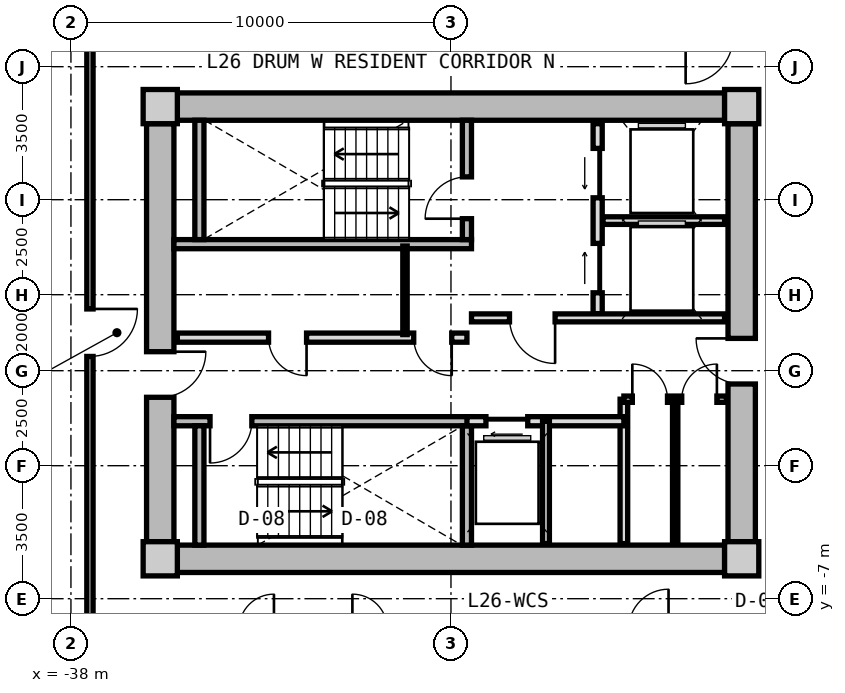
"""IFC4 building model, lengths in metres.
Left out: names, types, materials, properties, quantities, classifications, styles, units other than length and angle.
Written with IfcOpenShell. Run it as: python <this file> out.ifc"""

import sys

from ifc_helpers import new_model, si_unit, direction, frame, frame_2d, origin, origin_2d, place, context, subcontext, project, spatial, rectangle, extrude, source, transform, mapped, element, fill, save


model = new_model("IFC4")
c1 = context("Model", 3, precision=1e-05, world=origin(), true_north=direction((0.0, 1.0)))
c2 = subcontext(c1, "Body", "Model", "MODEL_VIEW")
j1 = project(units=[si_unit("LENGTHUNIT", "METRE"), si_unit("PLANEANGLEUNIT", "RADIAN")], contexts=[c1])
p1 = place(None, origin())
s1 = spatial("IfcSite", under=j1, at=p1, CompositionType="ELEMENT")
p2 = place(p1, origin())
s2 = spatial("IfcBuilding", under=s1, at=p2, CompositionType="ELEMENT")
p3 = place(p2, frame((0.0, 0.0, 87.1)))
s3 = spatial("IfcBuildingStorey", under=s2, at=p3, CompositionType="ELEMENT", Elevation=87.1)
m1 = source(origin(), c2, "Body", "SweptSolid", [
    extrude(rectangle(XDim=0.9, YDim=0.9, at=origin_2d()), origin(), (0.0, 0.0, 1.0), 3.05),
])
for number, where, z_axis, x_axis in (
    (1, (-35.65, -5.95, 0.0), (0.0, 0.0, 1.0), (1.0, 0.0, 0.0)),
    (2, (-20.35, -5.95, 0.0), (0.0, 0.0, 1.0), (1.0, 0.0, 0.0)),
    (3, (-20.35, 5.95, 0.0), (0.0, 0.0, 1.0), (1.0, 0.0, 0.0)),
    (4, (-35.65, 5.95, 0.0), (0.0, 0.0, 1.0), (1.0, 0.0, 0.0)),
):
    element("IfcColumn", number, at=place(p3, frame(where, z_axis=z_axis, x_axis=x_axis)), inside=s3, PredefinedType="COLUMN", context=c2, shape_type="MappedRepresentation", body=[
        mapped(m1, transform((0.0, 0.0, 0.0), x_axis=(1.0, 0.0, 0.0), y_axis=(0.0, 1.0, 0.0), z_axis=(0.0, 0.0, 1.0), scale=1.0)),
    ])
m2 = source(origin(), c2, "Body", "SweptSolid", [
    extrude(rectangle(XDim=14.4, YDim=0.72, at=frame_2d((7.2, 0.0))), origin(), (0.0, 0.0, 1.0), 2.79),
])
for number, where, z_axis, x_axis in (
    (5, (-35.2, 5.95, 0.0), (0.0, 0.0, 1.0), (1.0, 0.0, 0.0)),
    (6, (-20.8, -5.95, 0.0), (0.0, 0.0, 1.0), (-1.0, 0.0, 0.0)),
):
    element("IfcWall", number, at=place(p3, frame(where, z_axis=z_axis, x_axis=x_axis)), inside=s3, PredefinedType="SHEAR", context=c2, shape_type="MappedRepresentation", body=[
        mapped(m2, transform((0.0, 0.0, 0.0), x_axis=(1.0, 0.0, 0.0), y_axis=(0.0, 1.0, 0.0), z_axis=(0.0, 0.0, 1.0), scale=1.0)),
    ])
m3 = source(origin(), c2, "Body", "SweptSolid", [
    extrude(rectangle(XDim=11.0, YDim=0.72, at=frame_2d((5.5, 0.0))), origin(), (0.0, 0.0, 1.0), 2.79),
])
p4 = place(p3, frame((-35.65, -5.5, 0.0), z_axis=(0.0, 0.0, 1.0), x_axis=(0.0, 1.0, 0.0)))
e7 = element("IfcWall", 7, at=p4, inside=s3, PredefinedType="SHEAR", context=c2, shape_type="MappedRepresentation", body=[
    mapped(m3, transform((0.0, 0.0, 0.0), x_axis=(1.0, 0.0, 0.0), y_axis=(0.0, 1.0, 0.0), z_axis=(0.0, 0.0, 1.0), scale=1.0)),
])
p5 = place(p4, frame((3.8, 0.0, 0.0)))
e8 = element("IfcOpeningElement", 8, at=p5, cuts=e7, PredefinedType="OPENING", context=c2, shape_type="SweptSolid", body=[
    extrude(rectangle(XDim=1.2, YDim=2.15, at=frame_2d((0.6, 1.075))), frame((0.0, 0.37, 0.0), z_axis=(0.0, -1.0, 0.0), x_axis=(1.0, 0.0, 0.0)), (0.0, 0.0, 1.0), 0.74),
])
p6 = place(p3, frame((-20.35, 5.5, 0.0), z_axis=(0.0, 0.0, 1.0), x_axis=(0.0, -1.0, 0.0)))
e9 = element("IfcWall", 9, at=p6, inside=s3, PredefinedType="SHEAR", context=c2, shape_type="MappedRepresentation", body=[
    mapped(m3, transform((0.0, 0.0, 0.0), x_axis=(1.0, 0.0, 0.0), y_axis=(0.0, 1.0, 0.0), z_axis=(0.0, 0.0, 1.0), scale=1.0)),
])
p7 = place(p6, frame((5.65, 0.0, 0.0)))
e10 = element("IfcOpeningElement", 10, at=p7, cuts=e9, PredefinedType="OPENING", context=c2, shape_type="SweptSolid", body=[
    extrude(rectangle(XDim=1.2, YDim=2.15, at=frame_2d((0.6, 1.075))), frame((0.0, 0.37, 0.0), z_axis=(0.0, -1.0, 0.0), x_axis=(1.0, 0.0, 0.0)), (0.0, 0.0, 1.0), 0.74),
])
m4 = source(origin(), c2, "Body", "SweptSolid", [
    extrude(rectangle(XDim=7.83, YDim=0.24, at=frame_2d((3.915, 0.0))), origin(), (0.0, 0.0, 1.0), 2.79),
])
p8 = place(p3, frame((-35.29, 2.33, 0.0), z_axis=(0.0, 0.0, 1.0), x_axis=(1.0, 0.0, 0.0)))
e11 = element("IfcWall", 11, at=p8, inside=s3, PredefinedType="PARTITIONING", context=c2, shape_type="MappedRepresentation", body=[
    mapped(m4, transform((0.0, 0.0, 0.0), x_axis=(1.0, 0.0, 0.0), y_axis=(0.0, 1.0, 0.0), z_axis=(0.0, 0.0, 1.0), scale=1.0)),
])
m5 = source(origin(), c2, "Body", "SweptSolid", [
    extrude(rectangle(XDim=3.14, YDim=0.24, at=frame_2d((1.57, 0.0))), origin(), (0.0, 0.0, 1.0), 2.79),
])
p9 = place(p3, frame((-34.62, 2.45, 0.0), z_axis=(0.0, 0.0, 1.0), x_axis=(0.0, 1.0, 0.0)))
e12 = element("IfcWall", 12, at=p9, inside=s3, PredefinedType="PARTITIONING", context=c2, shape_type="MappedRepresentation", body=[
    mapped(m5, transform((0.0, 0.0, 0.0), x_axis=(1.0, 0.0, 0.0), y_axis=(0.0, 1.0, 0.0), z_axis=(0.0, 0.0, 1.0), scale=1.0)),
])
p10 = place(p3, frame((-27.58, 2.45, 0.0), z_axis=(0.0, 0.0, 1.0), x_axis=(0.0, 1.0, 0.0)))
e13 = element("IfcWall", 13, at=p10, inside=s3, PredefinedType="PARTITIONING", context=c2, shape_type="MappedRepresentation", body=[
    mapped(m5, transform((0.0, 0.0, 0.0), x_axis=(1.0, 0.0, 0.0), y_axis=(0.0, 1.0, 0.0), z_axis=(0.0, 0.0, 1.0), scale=1.0)),
])
p11 = place(p10, frame((0.55, 0.0, 0.0)))
e14 = element("IfcOpeningElement", 14, at=p11, cuts=e13, PredefinedType="OPENING", context=c2, shape_type="SweptSolid", body=[
    extrude(rectangle(XDim=1.1, YDim=2.15, at=frame_2d((0.55, 1.075))), frame((0.0, 0.13, 0.0), z_axis=(0.0, -1.0, 0.0), x_axis=(1.0, 0.0, 0.0)), (0.0, 0.0, 1.0), 0.26),
])
p12 = place(p3, frame((-35.29, -2.33, 0.0), z_axis=(0.0, 0.0, 1.0), x_axis=(1.0, 0.0, 0.0)))
e15 = element("IfcWall", 15, at=p12, inside=s3, PredefinedType="PARTITIONING", context=c2, shape_type="MappedRepresentation", body=[
    mapped(m4, transform((0.0, 0.0, 0.0), x_axis=(1.0, 0.0, 0.0), y_axis=(0.0, 1.0, 0.0), z_axis=(0.0, 0.0, 1.0), scale=1.0)),
])
p13 = place(p12, frame((0.95, 0.0, 0.0)))
e16 = element("IfcOpeningElement", 16, at=p13, cuts=e15, PredefinedType="OPENING", context=c2, shape_type="SweptSolid", body=[
    extrude(rectangle(XDim=1.1, YDim=2.15, at=frame_2d((0.55, 1.075))), frame((0.0, 0.13, 0.0), z_axis=(0.0, -1.0, 0.0), x_axis=(1.0, 0.0, 0.0)), (0.0, 0.0, 1.0), 0.26),
])
for number, where, z_axis, x_axis in (
    (17, (-34.62, -5.59, 0.0), (0.0, 0.0, 1.0), (0.0, 1.0, 0.0)),
    (18, (-27.58, -5.59, 0.0), (0.0, 0.0, 1.0), (0.0, 1.0, 0.0)),
):
    element("IfcWall", number, at=place(p3, frame(where, z_axis=z_axis, x_axis=x_axis)), inside=s3, PredefinedType="PARTITIONING", context=c2, shape_type="MappedRepresentation", body=[
        mapped(m5, transform((0.0, 0.0, 0.0), x_axis=(1.0, 0.0, 0.0), y_axis=(0.0, 1.0, 0.0), z_axis=(0.0, 0.0, 1.0), scale=1.0)),
    ])
m6 = source(origin(), c2, "Body", "SweptSolid", [
    extrude(rectangle(XDim=5.0, YDim=0.24, at=frame_2d((2.5, 0.0))), origin(), (0.0, 0.0, 1.0), 2.775),
])
p14 = place(p3, frame((-24.14, 0.5, 0.0), z_axis=(0.0, 0.0, 1.0), x_axis=(0.0, 1.0, 0.0)))
e19 = element("IfcWall", 19, at=p14, inside=s3, PredefinedType="PARTITIONING", context=c2, shape_type="MappedRepresentation", body=[
    mapped(m6, transform((0.0, 0.0, 0.0), x_axis=(1.0, 0.0, 0.0), y_axis=(0.0, 1.0, 0.0), z_axis=(0.0, 0.0, 1.0), scale=1.0)),
])
p15 = place(p14, frame((3.05, 0.0, 0.0)))
e20 = element("IfcOpeningElement", 20, at=p15, cuts=e19, PredefinedType="OPENING", context=c2, shape_type="SweptSolid", body=[
    extrude(rectangle(XDim=1.3, YDim=2.2, at=frame_2d((0.65, 1.1))), frame((0.0, 0.13, 0.0), z_axis=(0.0, -1.0, 0.0), x_axis=(1.0, 0.0, 0.0)), (0.0, 0.0, 1.0), 0.26),
])
p16 = place(p14, frame((0.55, 0.0, 0.0)))
e21 = element("IfcOpeningElement", 21, at=p16, cuts=e19, PredefinedType="OPENING", context=c2, shape_type="SweptSolid", body=[
    extrude(rectangle(XDim=1.3, YDim=2.2, at=frame_2d((0.65, 1.1))), frame((0.0, 0.13, 0.0), z_axis=(0.0, -1.0, 0.0), x_axis=(1.0, 0.0, 0.0)), (0.0, 0.0, 1.0), 0.26),
])
m7 = source(origin(), c2, "Body", "SweptSolid", [
    extrude(rectangle(XDim=3.2, YDim=0.2, at=frame_2d((1.6, 0.0))), origin(), (0.0, 0.0, 1.0), 2.775),
])
p17 = place(p3, frame((-24.0, 2.95, 0.0), z_axis=(0.0, 0.0, 1.0), x_axis=(1.0, 0.0, 0.0)))
e22 = element("IfcWall", 22, at=p17, inside=s3, PredefinedType="PARTITIONING", context=c2, shape_type="MappedRepresentation", body=[
    mapped(m7, transform((0.0, 0.0, 0.0), x_axis=(1.0, 0.0, 0.0), y_axis=(0.0, 1.0, 0.0), z_axis=(0.0, 0.0, 1.0), scale=1.0)),
])
m8 = source(origin(), c2, "Body", "SweptSolid", [
    extrude(rectangle(XDim=6.66, YDim=0.21, at=frame_2d((3.33, 0.0))), origin(), (0.0, 0.0, 1.0), 2.775),
])
p18 = place(p3, frame((-27.46, 0.39, 0.0), z_axis=(0.0, 0.0, 1.0), x_axis=(1.0, 0.0, 0.0)))
e23 = element("IfcWall", 23, at=p18, inside=s3, PredefinedType="PARTITIONING", context=c2, shape_type="MappedRepresentation", body=[
    mapped(m8, transform((0.0, 0.0, 0.0), x_axis=(1.0, 0.0, 0.0), y_axis=(0.0, 1.0, 0.0), z_axis=(0.0, 0.0, 1.0), scale=1.0)),
])
p19 = place(p18, frame((1.0, 0.0, 0.0)))
e24 = element("IfcOpeningElement", 24, at=p19, cuts=e23, PredefinedType="OPENING", context=c2, shape_type="SweptSolid", body=[
    extrude(rectangle(XDim=1.2, YDim=2.15, at=frame_2d((0.6, 1.075))), frame((0.0, 0.115, 0.0), z_axis=(0.0, -1.0, 0.0), x_axis=(1.0, 0.0, 0.0)), (0.0, 0.0, 1.0), 0.23),
])
m9 = source(origin(), c2, "Body", "SweptSolid", [
    extrude(rectangle(XDim=7.62, YDim=0.24, at=frame_2d((3.81, 0.0))), origin(), (0.0, 0.0, 1.0), 2.775),
])
p20 = place(p3, frame((-35.2, -0.13, 0.0), z_axis=(0.0, 0.0, 1.0), x_axis=(1.0, 0.0, 0.0)))
e25 = element("IfcWall", 25, at=p20, inside=s3, PredefinedType="PARTITIONING", context=c2, shape_type="MappedRepresentation", body=[
    mapped(m9, transform((0.0, 0.0, 0.0), x_axis=(1.0, 0.0, 0.0), y_axis=(0.0, 1.0, 0.0), z_axis=(0.0, 0.0, 1.0), scale=1.0)),
])
p21 = place(p20, frame((6.22, 0.0, 0.0)))
e26 = element("IfcOpeningElement", 26, at=p21, cuts=e25, PredefinedType="OPENING", context=c2, shape_type="SweptSolid", body=[
    extrude(rectangle(XDim=1.0, YDim=2.1, at=frame_2d((0.5, 1.05))), frame((0.0, 0.13, 0.0), z_axis=(0.0, -1.0, 0.0), x_axis=(1.0, 0.0, 0.0)), (0.0, 0.0, 1.0), 0.26),
])
p22 = place(p20, frame((2.4, 0.0, 0.0)))
e27 = element("IfcOpeningElement", 27, at=p22, cuts=e25, PredefinedType="OPENING", context=c2, shape_type="SweptSolid", body=[
    extrude(rectangle(XDim=1.0, YDim=2.1, at=frame_2d((0.5, 1.05))), frame((0.0, 0.13, 0.0), z_axis=(0.0, -1.0, 0.0), x_axis=(1.0, 0.0, 0.0)), (0.0, 0.0, 1.0), 0.26),
])
m10 = source(origin(), c2, "Body", "SweptSolid", [
    extrude(rectangle(XDim=2.33, YDim=0.115, at=frame_2d((1.165, 0.0))), origin(), (0.0, 0.0, 1.0), 2.775),
])
p23 = place(p3, frame((-29.21, -0.05, 0.0), z_axis=(0.0, 0.0, 1.0), x_axis=(0.0, 1.0, 0.0)))
e28 = element("IfcWall", 28, at=p23, inside=s3, PredefinedType="PARTITIONING", context=c2, shape_type="MappedRepresentation", body=[
    mapped(m10, transform((0.0, 0.0, 0.0), x_axis=(1.0, 0.0, 0.0), y_axis=(0.0, 1.0, 0.0), z_axis=(0.0, 0.0, 1.0), scale=1.0)),
])
m11 = source(origin(), c2, "Body", "SweptSolid", [
    extrude(rectangle(XDim=3.8, YDim=0.2, at=frame_2d((1.9, 0.0))), origin(), (0.0, 0.0, 1.0), 2.775),
])
p24 = place(p3, frame((-23.45, -5.55, 0.0), z_axis=(0.0, 0.0, 1.0), x_axis=(0.0, 1.0, 0.0)))
e29 = element("IfcWall", 29, at=p24, inside=s3, PredefinedType="PARTITIONING", context=c2, shape_type="MappedRepresentation", body=[
    mapped(m11, transform((0.0, 0.0, 0.0), x_axis=(1.0, 0.0, 0.0), y_axis=(0.0, 1.0, 0.0), z_axis=(0.0, 0.0, 1.0), scale=1.0)),
])
m12 = source(origin(), c2, "Body", "SweptSolid", [
    extrude(rectangle(XDim=4.13, YDim=0.24, at=frame_2d((2.065, 0.0))), origin(), (0.0, 0.0, 1.0), 2.775),
])
p25 = place(p3, frame((-27.58, -2.33, 0.0), z_axis=(0.0, 0.0, 1.0), x_axis=(1.0, 0.0, 0.0)))
e30 = element("IfcWall", 30, at=p25, inside=s3, PredefinedType="PARTITIONING", context=c2, shape_type="MappedRepresentation", body=[
    mapped(m12, transform((0.0, 0.0, 0.0), x_axis=(1.0, 0.0, 0.0), y_axis=(0.0, 1.0, 0.0), z_axis=(0.0, 0.0, 1.0), scale=1.0)),
])
p26 = place(p25, frame((0.5, 0.0, 0.0)))
e31 = element("IfcOpeningElement", 31, at=p26, cuts=e30, PredefinedType="OPENING", context=c2, shape_type="SweptSolid", body=[
    extrude(rectangle(XDim=1.1, YDim=2.2, at=frame_2d((0.55, 1.1))), frame((0.0, 0.13, 0.0), z_axis=(0.0, -1.0, 0.0), x_axis=(1.0, 0.0, 0.0)), (0.0, 0.0, 1.0), 0.26),
])
m13 = source(origin(), c2, "Body", "SweptSolid", [
    extrude(rectangle(XDim=3.22, YDim=0.18, at=frame_2d((1.61, 0.0))), origin(), (0.0, 0.0, 1.0), 2.775),
])
p27 = place(p3, frame((-25.5, -5.55, 0.0), z_axis=(0.0, 0.0, 1.0), x_axis=(0.0, 1.0, 0.0)))
e32 = element("IfcWall", 32, at=p27, inside=s3, PredefinedType="PARTITIONING", context=c2, shape_type="MappedRepresentation", body=[
    mapped(m13, transform((0.0, 0.0, 0.0), x_axis=(1.0, 0.0, 0.0), y_axis=(0.0, 1.0, 0.0), z_axis=(0.0, 0.0, 1.0), scale=1.0)),
])
m14 = source(origin(), c2, "Body", "SweptSolid", [
    extrude(rectangle(XDim=2.7, YDim=0.165, at=frame_2d((1.35, 0.0))), origin(), (0.0, 0.0, 1.0), 2.775),
])
p28 = place(p3, frame((-23.45, -1.75, 0.0), z_axis=(0.0, 0.0, 1.0), x_axis=(1.0, 0.0, 0.0)))
e33 = element("IfcWall", 33, at=p28, inside=s3, PredefinedType="PARTITIONING", context=c2, shape_type="MappedRepresentation", body=[
    mapped(m14, transform((0.0, 0.0, 0.0), x_axis=(1.0, 0.0, 0.0), y_axis=(0.0, 1.0, 0.0), z_axis=(0.0, 0.0, 1.0), scale=1.0)),
])
p29 = place(p28, frame((0.222, 0.0, 0.0)))
e34 = element("IfcOpeningElement", 34, at=p29, cuts=e33, PredefinedType="OPENING", context=c2, shape_type="SweptSolid", body=[
    extrude(rectangle(XDim=0.925, YDim=2.1, at=frame_2d((0.462, 1.05))), frame((0.0, 0.093, 0.0), z_axis=(0.0, -1.0, 0.0), x_axis=(1.0, 0.0, 0.0)), (0.0, 0.0, 1.0), 0.185),
])
p30 = place(p28, frame((1.522, 0.0, 0.0)))
e35 = element("IfcOpeningElement", 35, at=p30, cuts=e33, PredefinedType="OPENING", context=c2, shape_type="SweptSolid", body=[
    extrude(rectangle(XDim=0.925, YDim=2.1, at=frame_2d((0.462, 1.05))), frame((0.0, 0.093, 0.0), z_axis=(0.0, -1.0, 0.0), x_axis=(1.0, 0.0, 0.0)), (0.0, 0.0, 1.0), 0.185),
])
m15 = source(origin(), c2, "Body", "SweptSolid", [
    extrude(rectangle(XDim=3.8, YDim=0.14, at=frame_2d((1.9, 0.0))), origin(), (0.0, 0.0, 1.0), 2.775),
])
p31 = place(p3, frame((-22.1, -5.55, 0.0), z_axis=(0.0, 0.0, 1.0), x_axis=(0.0, 1.0, 0.0)))
e36 = element("IfcWall", 36, at=p31, inside=s3, PredefinedType="PARTITIONING", context=c2, shape_type="MappedRepresentation", body=[
    mapped(m15, transform((0.0, 0.0, 0.0), x_axis=(1.0, 0.0, 0.0), y_axis=(0.0, 1.0, 0.0), z_axis=(0.0, 0.0, 1.0), scale=1.0)),
])
m16 = source(origin(), c2, "Body", "SweptSolid", [
    extrude(rectangle(XDim=15.6, YDim=0.165, at=frame_2d((7.8, 0.0))), origin(), (0.0, 0.0, 1.0), 2.775),
])
p32 = place(p3, frame((-37.5, -7.8, 0.0), z_axis=(0.0, 0.0, 1.0), x_axis=(0.0, 1.0, 0.0)))
e37 = element("IfcWall", 37, at=p32, inside=s3, PredefinedType="PARTITIONING", context=c2, shape_type="MappedRepresentation", body=[
    mapped(m16, transform((0.0, 0.0, 0.0), x_axis=(1.0, 0.0, 0.0), y_axis=(0.0, 1.0, 0.0), z_axis=(0.0, 0.0, 1.0), scale=1.0)),
])
p33 = place(p32, frame((7.175, 0.0, 0.0)))
e38 = element("IfcOpeningElement", 38, at=p33, cuts=e37, PredefinedType="OPENING", context=c2, shape_type="SweptSolid", body=[
    extrude(rectangle(XDim=1.25, YDim=2.2, at=frame_2d((0.625, 1.1))), frame((0.0, 0.093, 0.0), z_axis=(0.0, -1.0, 0.0), x_axis=(1.0, 0.0, 0.0)), (0.0, 0.0, 1.0), 0.185),
])
m17 = source(origin(), c2, "Body", "SweptSolid", [
    extrude(rectangle(XDim=1.1, YDim=2.15, at=frame_2d((0.55, 1.075))), frame((0.0, 0.025, 0.0), z_axis=(0.0, -1.0, 0.0), x_axis=(1.0, 0.0, 0.0)), (0.0, 0.0, 1.0), 0.05),
])
p34 = place(p11, origin())
e39 = element("IfcDoor", 39, at=p34, inside=s3, OperationType="SINGLE_SWING_LEFT", PredefinedType="DOOR", context=c2, shape_type="MappedRepresentation", body=[
    mapped(m17, transform((0.0, 0.0, 0.0), x_axis=(1.0, 0.0, 0.0), y_axis=(0.0, 1.0, 0.0), z_axis=(0.0, 0.0, 1.0), scale=1.0)),
])
fill(e14, e39)
p35 = place(p13, frame((1.1, 0.0, 0.0), z_axis=(0.0, 0.0, 1.0), x_axis=(-1.0, 0.0, 0.0)))
e40 = element("IfcDoor", 40, at=p35, inside=s3, OperationType="SINGLE_SWING_RIGHT", PredefinedType="DOOR", context=c2, shape_type="MappedRepresentation", body=[
    mapped(m17, transform((0.0, 0.0, 0.0), x_axis=(1.0, 0.0, 0.0), y_axis=(0.0, 1.0, 0.0), z_axis=(0.0, 0.0, 1.0), scale=1.0)),
])
fill(e16, e40)
m18 = source(origin(), c2, "Body", "SweptSolid", [
    extrude(rectangle(XDim=1.3, YDim=2.2, at=frame_2d((0.65, 1.1))), frame((0.0, 0.025, 0.0), z_axis=(0.0, -1.0, 0.0), x_axis=(1.0, 0.0, 0.0)), (0.0, 0.0, 1.0), 0.05),
])
p36 = place(p15, origin())
e41 = element("IfcDoor", 41, at=p36, inside=s3, OperationType="SLIDING_TO_LEFT", PredefinedType="DOOR", context=c2, shape_type="MappedRepresentation", body=[
    mapped(m18, transform((0.0, 0.0, 0.0), x_axis=(1.0, 0.0, 0.0), y_axis=(0.0, 1.0, 0.0), z_axis=(0.0, 0.0, 1.0), scale=1.0)),
])
fill(e20, e41)
p37 = place(p16, origin())
e42 = element("IfcDoor", 42, at=p37, inside=s3, OperationType="SLIDING_TO_RIGHT", PredefinedType="DOOR", context=c2, shape_type="MappedRepresentation", body=[
    mapped(m18, transform((0.0, 0.0, 0.0), x_axis=(1.0, 0.0, 0.0), y_axis=(0.0, 1.0, 0.0), z_axis=(0.0, 0.0, 1.0), scale=1.0)),
])
fill(e21, e42)
m19 = source(origin(), c2, "Body", "SweptSolid", [
    extrude(rectangle(XDim=1.2, YDim=2.15, at=frame_2d((0.6, 1.075))), frame((0.0, 0.025, 0.0), z_axis=(0.0, -1.0, 0.0), x_axis=(1.0, 0.0, 0.0)), (0.0, 0.0, 1.0), 0.05),
])
p38 = place(p19, frame((1.2, 0.0, 0.0), z_axis=(0.0, 0.0, 1.0), x_axis=(-1.0, 0.0, 0.0)))
e43 = element("IfcDoor", 43, at=p38, inside=s3, OperationType="SINGLE_SWING_LEFT", PredefinedType="DOOR", context=c2, shape_type="MappedRepresentation", body=[
    mapped(m19, transform((0.0, 0.0, 0.0), x_axis=(1.0, 0.0, 0.0), y_axis=(0.0, 1.0, 0.0), z_axis=(0.0, 0.0, 1.0), scale=1.0)),
])
fill(e24, e43)
p39 = place(p5, frame((1.2, 0.0, 0.0), z_axis=(0.0, 0.0, 1.0), x_axis=(-1.0, 0.0, 0.0)))
e44 = element("IfcDoor", 44, at=p39, inside=s3, OperationType="SINGLE_SWING_LEFT", PredefinedType="DOOR", context=c2, shape_type="MappedRepresentation", body=[
    mapped(m19, transform((0.0, 0.0, 0.0), x_axis=(1.0, 0.0, 0.0), y_axis=(0.0, 1.0, 0.0), z_axis=(0.0, 0.0, 1.0), scale=1.0)),
])
fill(e8, e44)
p40 = place(p7, frame((1.2, 0.0, 0.0), z_axis=(0.0, 0.0, 1.0), x_axis=(-1.0, 0.0, 0.0)))
e45 = element("IfcDoor", 45, at=p40, inside=s3, OperationType="SINGLE_SWING_RIGHT", PredefinedType="DOOR", context=c2, shape_type="MappedRepresentation", body=[
    mapped(m19, transform((0.0, 0.0, 0.0), x_axis=(1.0, 0.0, 0.0), y_axis=(0.0, 1.0, 0.0), z_axis=(0.0, 0.0, 1.0), scale=1.0)),
])
fill(e10, e45)
m20 = source(origin(), c2, "Body", "SweptSolid", [
    extrude(rectangle(XDim=1.0, YDim=2.1, at=frame_2d((0.5, 1.05))), frame((0.0, 0.025, 0.0), z_axis=(0.0, -1.0, 0.0), x_axis=(1.0, 0.0, 0.0)), (0.0, 0.0, 1.0), 0.05),
])
p41 = place(p21, frame((1.0, 0.0, 0.0), z_axis=(0.0, 0.0, 1.0), x_axis=(-1.0, 0.0, 0.0)))
e46 = element("IfcDoor", 46, at=p41, inside=s3, OperationType="SINGLE_SWING_LEFT", PredefinedType="DOOR", context=c2, shape_type="MappedRepresentation", body=[
    mapped(m20, transform((0.0, 0.0, 0.0), x_axis=(1.0, 0.0, 0.0), y_axis=(0.0, 1.0, 0.0), z_axis=(0.0, 0.0, 1.0), scale=1.0)),
])
fill(e26, e46)
p42 = place(p22, frame((1.0, 0.0, 0.0), z_axis=(0.0, 0.0, 1.0), x_axis=(-1.0, 0.0, 0.0)))
e47 = element("IfcDoor", 47, at=p42, inside=s3, OperationType="SINGLE_SWING_LEFT", PredefinedType="DOOR", context=c2, shape_type="MappedRepresentation", body=[
    mapped(m20, transform((0.0, 0.0, 0.0), x_axis=(1.0, 0.0, 0.0), y_axis=(0.0, 1.0, 0.0), z_axis=(0.0, 0.0, 1.0), scale=1.0)),
])
fill(e27, e47)
m21 = source(origin(), c2, "Body", "SweptSolid", [
    extrude(rectangle(XDim=1.1, YDim=2.2, at=frame_2d((0.55, 1.1))), frame((0.0, 0.025, 0.0), z_axis=(0.0, -1.0, 0.0), x_axis=(1.0, 0.0, 0.0)), (0.0, 0.0, 1.0), 0.05),
])
p43 = place(p26, frame((1.1, 0.0, 0.0), z_axis=(0.0, 0.0, 1.0), x_axis=(-1.0, 0.0, 0.0)))
e48 = element("IfcDoor", 48, at=p43, inside=s3, OperationType="SLIDING_TO_LEFT", PredefinedType="DOOR", context=c2, shape_type="MappedRepresentation", body=[
    mapped(m21, transform((0.0, 0.0, 0.0), x_axis=(1.0, 0.0, 0.0), y_axis=(0.0, 1.0, 0.0), z_axis=(0.0, 0.0, 1.0), scale=1.0)),
])
fill(e31, e48)
m22 = source(origin(), c2, "Body", "SweptSolid", [
    extrude(rectangle(XDim=0.925, YDim=2.1, at=frame_2d((0.462, 1.05))), frame((0.0, 0.025, 0.0), z_axis=(0.0, -1.0, 0.0), x_axis=(1.0, 0.0, 0.0)), (0.0, 0.0, 1.0), 0.05),
])
p44 = place(p29, origin())
e49 = element("IfcDoor", 49, at=p44, inside=s3, OperationType="SINGLE_SWING_LEFT", PredefinedType="DOOR", context=c2, shape_type="MappedRepresentation", body=[
    mapped(m22, transform((0.0, 0.0, 0.0), x_axis=(1.0, 0.0, 0.0), y_axis=(0.0, 1.0, 0.0), z_axis=(0.0, 0.0, 1.0), scale=1.0)),
])
fill(e34, e49)
p45 = place(p30, origin())
e50 = element("IfcDoor", 50, at=p45, inside=s3, OperationType="SINGLE_SWING_RIGHT", PredefinedType="DOOR", context=c2, shape_type="MappedRepresentation", body=[
    mapped(m22, transform((0.0, 0.0, 0.0), x_axis=(1.0, 0.0, 0.0), y_axis=(0.0, 1.0, 0.0), z_axis=(0.0, 0.0, 1.0), scale=1.0)),
])
fill(e35, e50)
m23 = source(origin(), c2, "Body", "SweptSolid", [
    extrude(rectangle(XDim=1.25, YDim=2.2, at=frame_2d((0.625, 1.1))), frame((0.0, 0.025, 0.0), z_axis=(0.0, -1.0, 0.0), x_axis=(1.0, 0.0, 0.0)), (0.0, 0.0, 1.0), 0.05),
])
p46 = place(p33, frame((1.25, 0.0, 0.0), z_axis=(0.0, 0.0, 1.0), x_axis=(-1.0, 0.0, 0.0)))
e51 = element("IfcDoor", 51, at=p46, inside=s3, OperationType="SINGLE_SWING_LEFT", PredefinedType="DOOR", context=c2, shape_type="MappedRepresentation", body=[
    mapped(m23, transform((0.0, 0.0, 0.0), x_axis=(1.0, 0.0, 0.0), y_axis=(0.0, 1.0, 0.0), z_axis=(0.0, 0.0, 1.0), scale=1.0)),
])
fill(e38, e51)
save(model, sys.argv[1])
